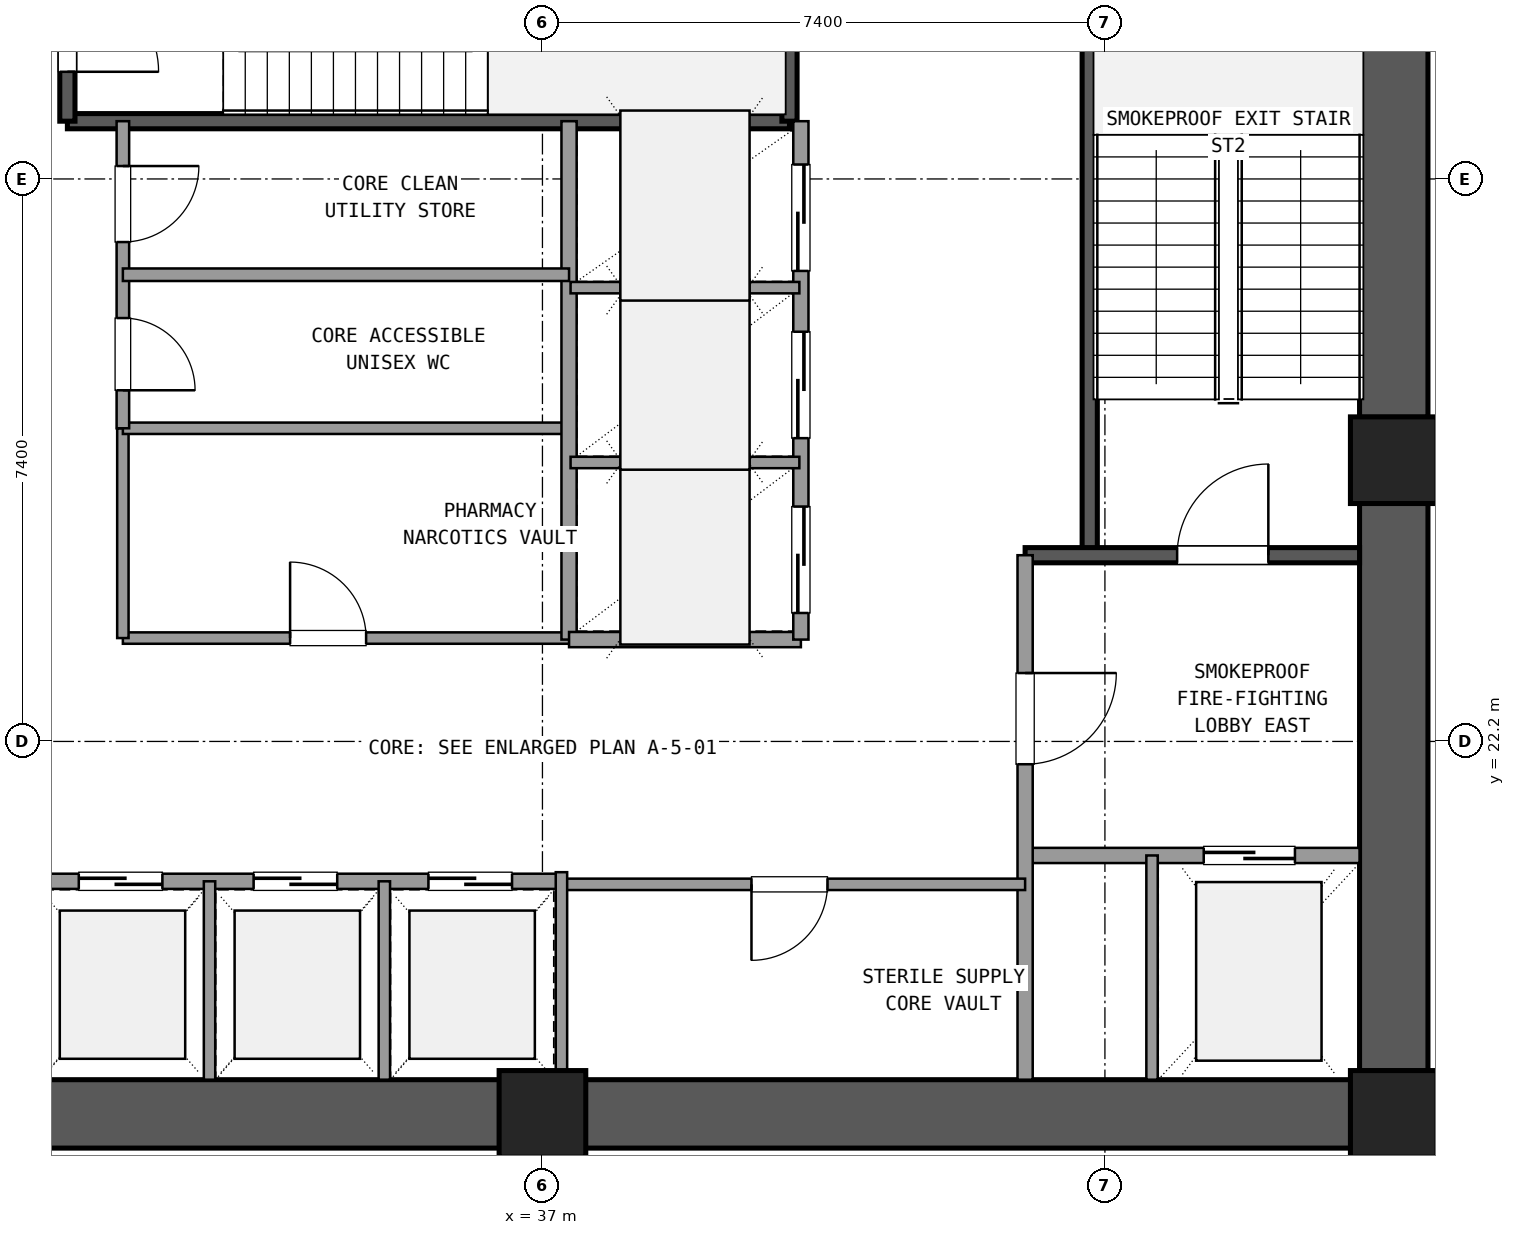
"""IFC4 building model, lengths in metres.
Left out: names, types, materials, properties, quantities, classifications, styles, units other than length and angle.
Written with IfcOpenShell. Run it as: python <this file> out.ifc"""

import sys

from ifc_helpers import new_model, si_unit, direction, frame, frame_2d, origin, origin_2d, place, context, subcontext, project, spatial, rectangle, extrude, element, fill, save


model = new_model("IFC4")
c1 = context("Model", 3, precision=1e-05, world=origin(), true_north=direction((0.0, 1.0)))
c2 = subcontext(c1, "Body", "Model", "MODEL_VIEW")
j1 = project(units=[si_unit("LENGTHUNIT", "METRE"), si_unit("PLANEANGLEUNIT", "RADIAN")], contexts=[c1])
p1 = place(None, origin())
s1 = spatial("IfcSite", under=j1, at=p1, CompositionType="ELEMENT")
p2 = place(p1, origin())
s2 = spatial("IfcBuilding", under=s1, at=p2, CompositionType="ELEMENT")
p3 = place(p2, frame((0.0, 0.0, -4.86)))
s3 = spatial("IfcBuildingStorey", under=s2, at=p3, CompositionType="ELEMENT", Elevation=-4.86)
for number, where, z_axis, x_axis in (
    (1, (37.0, 17.3, 0.0), (0.0, 0.0, 1.0), (1.0, 0.0, 0.0)),
    (2, (48.2, 17.3, 0.0), (0.0, 0.0, 1.0), (1.0, 0.0, 0.0)),
    (3, (48.2, 25.9, 0.0), (0.0, 0.0, 1.0), (1.0, 0.0, 0.0)),
):
    element("IfcColumn", number, at=place(p3, frame(where, z_axis=z_axis, x_axis=x_axis)), inside=s3, PredefinedType="COLUMN", context=c2, shape_type="SweptSolid", body=[
        extrude(rectangle(XDim=1.14, YDim=1.14, at=origin_2d()), origin(), (0.0, 0.0, 1.0), 4.86),
    ])
for number, where, z_axis, x_axis in (
    (4, (26.365, 17.3, 0.0), (0.0, 0.0, 1.0), (1.0, 0.0, 0.0)),
    (5, (37.565, 17.3, 0.0), (0.0, 0.0, 1.0), (1.0, 0.0, 0.0)),
):
    element("IfcWall", number, at=place(p3, frame(where, z_axis=z_axis, x_axis=x_axis)), inside=s3, PredefinedType="SHEAR", context=c2, shape_type="SweptSolid", body=[
        extrude(rectangle(XDim=10.07, YDim=0.9, at=frame_2d((5.035, 0.0))), origin(), (0.0, 0.0, 1.0), 4.56),
    ])
for number, where, z_axis, x_axis in (
    (6, (48.2, 17.865, 0.0), (0.0, 0.0, 1.0), (0.0, 1.0, 0.0)),
    (7, (48.2, 26.465, 0.0), (0.0, 0.0, 1.0), (0.0, 1.0, 0.0)),
):
    element("IfcWall", number, at=place(p3, frame(where, z_axis=z_axis, x_axis=x_axis)), inside=s3, PredefinedType="SHEAR", context=c2, shape_type="SweptSolid", body=[
        extrude(rectangle(XDim=7.47, YDim=0.9, at=frame_2d((3.735, 0.0))), origin(), (0.0, 0.0, 1.0), 4.56),
    ])
p4 = place(p3, frame((44.2, 24.65, 0.0), z_axis=(0.0, 0.0, 1.0), x_axis=(0.0, 1.0, 0.0)))
e8 = element("IfcWall", 8, at=p4, inside=s3, PredefinedType="SHEAR", context=c2, shape_type="SweptSolid", body=[
    extrude(rectangle(XDim=9.4, YDim=0.2, at=frame_2d((4.7, 0.0))), origin(), (0.0, 0.0, 1.0), 4.56),
])
p5 = place(p3, frame((43.35, 24.65, 0.0), z_axis=(0.0, 0.0, 1.0), x_axis=(1.0, 0.0, 0.0)))
e9 = element("IfcWall", 9, at=p5, inside=s3, PredefinedType="SHEAR", context=c2, shape_type="SweptSolid", body=[
    extrude(rectangle(XDim=4.4, YDim=0.2, at=frame_2d((2.2, 0.0))), origin(), (0.0, 0.0, 1.0), 4.56),
])
p6 = place(p5, frame((2.0, 0.0, 0.0)))
e10 = element("IfcOpeningElement", 10, at=p6, cuts=e9, PredefinedType="OPENING", context=c2, shape_type="SweptSolid", body=[
    extrude(rectangle(XDim=1.2, YDim=2.15, at=frame_2d((0.6, 1.075))), frame((0.0, 0.11, 0.0), z_axis=(0.0, -1.0, 0.0), x_axis=(1.0, 0.0, 0.0)), (0.0, 0.0, 1.0), 0.22),
])
p7 = place(p3, frame((30.75, 30.36, 0.0), z_axis=(0.0, 0.0, 1.0), x_axis=(1.0, 0.0, 0.0)))
e11 = element("IfcWall", 11, at=p7, inside=s3, PredefinedType="SHEAR", context=c2, shape_type="SweptSolid", body=[
    extrude(rectangle(XDim=9.5, YDim=0.2, at=frame_2d((4.75, 0.0))), origin(), (0.0, 0.0, 1.0), 4.56),
])
p8 = place(p3, frame((30.75, 30.36, 0.0), z_axis=(0.0, 0.0, 1.0), x_axis=(0.0, 1.0, 0.0)))
e12 = element("IfcWall", 12, at=p8, inside=s3, PredefinedType="SHEAR", context=c2, shape_type="SweptSolid", body=[
    extrude(rectangle(XDim=3.69, YDim=0.2, at=frame_2d((1.845, 0.0))), origin(), (0.0, 0.0, 1.0), 4.56),
])
p9 = place(p8, frame((0.65, 0.0, 0.0)))
e13 = element("IfcOpeningElement", 13, at=p9, cuts=e12, PredefinedType="OPENING", context=c2, shape_type="SweptSolid", body=[
    extrude(rectangle(XDim=1.2, YDim=2.15, at=frame_2d((0.6, 1.075))), frame((0.0, 0.11, 0.0), z_axis=(0.0, -1.0, 0.0), x_axis=(1.0, 0.0, 0.0)), (0.0, 0.0, 1.0), 0.22),
])
p10 = place(p3, frame((40.25, 30.36, 0.0), z_axis=(0.0, 0.0, 1.0), x_axis=(0.0, 1.0, 0.0)))
e14 = element("IfcWall", 14, at=p10, inside=s3, PredefinedType="SHEAR", context=c2, shape_type="SweptSolid", body=[
    extrude(rectangle(XDim=3.69, YDim=0.2, at=frame_2d((1.845, 0.0))), origin(), (0.0, 0.0, 1.0), 4.56),
])
p11 = place(p3, frame((43.35, 20.7, 0.0), z_axis=(0.0, 0.0, 1.0), x_axis=(1.0, 0.0, 0.0)))
e15 = element("IfcWall", 15, at=p11, inside=s3, PredefinedType="SOLIDWALL", context=c2, shape_type="SweptSolid", body=[
    extrude(rectangle(XDim=4.4, YDim=0.2, at=frame_2d((2.2, 0.0))), origin(), (0.0, 0.0, 1.0), 3.85),
])
p12 = place(p11, frame((2.35, 0.0, 0.0)))
e16 = element("IfcOpeningElement", 16, at=p12, cuts=e15, PredefinedType="OPENING", context=c2, shape_type="SweptSolid", body=[
    extrude(rectangle(XDim=1.2, YDim=2.15, at=frame_2d((0.6, 1.075))), frame((0.0, 0.11, 0.0), z_axis=(0.0, -1.0, 0.0), x_axis=(1.0, 0.0, 0.0)), (0.0, 0.0, 1.0), 0.22),
])
p13 = place(p3, frame((43.35, 17.75, 0.0), z_axis=(0.0, 0.0, 1.0), x_axis=(0.0, 1.0, 0.0)))
e17 = element("IfcWall", 17, at=p13, inside=s3, PredefinedType="SOLIDWALL", context=c2, shape_type="SweptSolid", body=[
    extrude(rectangle(XDim=6.9, YDim=0.2, at=frame_2d((3.45, 0.0))), origin(), (0.0, 0.0, 1.0), 3.85),
])
p14 = place(p13, frame((4.15, 0.0, 0.0)))
e18 = element("IfcOpeningElement", 18, at=p14, cuts=e17, PredefinedType="OPENING", context=c2, shape_type="SweptSolid", body=[
    extrude(rectangle(XDim=1.2, YDim=2.15, at=frame_2d((0.6, 1.075))), frame((0.0, 0.11, 0.0), z_axis=(0.0, -1.0, 0.0), x_axis=(1.0, 0.0, 0.0)), (0.0, 0.0, 1.0), 0.22),
])
p15 = place(p3, frame((45.02, 17.75, 0.0), z_axis=(0.0, 0.0, 1.0), x_axis=(0.0, 1.0, 0.0)))
e19 = element("IfcWall", 19, at=p15, inside=s3, PredefinedType="PARTITIONING", context=c2, shape_type="SweptSolid", body=[
    extrude(rectangle(XDim=2.95, YDim=0.15, at=frame_2d((1.475, 0.0))), origin(), (0.0, 0.0, 1.0), 3.85),
])
p16 = place(p3, frame((30.25, 20.36, 0.0), z_axis=(0.0, 0.0, 1.0), x_axis=(1.0, 0.0, 0.0)))
e20 = element("IfcWall", 20, at=p16, inside=s3, PredefinedType="SOLIDWALL", context=c2, shape_type="SweptSolid", body=[
    extrude(rectangle(XDim=7.0, YDim=0.2, at=frame_2d((3.5, 0.0))), origin(), (0.0, 0.0, 1.0), 3.85),
])
p17 = place(p16, frame((0.65, 0.0, 0.0)))
e21 = element("IfcOpeningElement", 21, at=p17, cuts=e20, PredefinedType="OPENING", context=c2, shape_type="SweptSolid", body=[
    extrude(rectangle(XDim=1.1, YDim=2.15, at=frame_2d((0.55, 1.075))), frame((0.0, 0.11, 0.0), z_axis=(0.0, -1.0, 0.0), x_axis=(1.0, 0.0, 0.0)), (0.0, 0.0, 1.0), 0.22),
])
p18 = place(p16, frame((2.95, 0.0, 0.0)))
e22 = element("IfcOpeningElement", 22, at=p18, cuts=e20, PredefinedType="OPENING", context=c2, shape_type="SweptSolid", body=[
    extrude(rectangle(XDim=1.1, YDim=2.15, at=frame_2d((0.55, 1.075))), frame((0.0, 0.11, 0.0), z_axis=(0.0, -1.0, 0.0), x_axis=(1.0, 0.0, 0.0)), (0.0, 0.0, 1.0), 0.22),
])
p19 = place(p16, frame((5.25, 0.0, 0.0)))
e23 = element("IfcOpeningElement", 23, at=p19, cuts=e20, PredefinedType="OPENING", context=c2, shape_type="SweptSolid", body=[
    extrude(rectangle(XDim=1.1, YDim=2.15, at=frame_2d((0.55, 1.075))), frame((0.0, 0.11, 0.0), z_axis=(0.0, -1.0, 0.0), x_axis=(1.0, 0.0, 0.0)), (0.0, 0.0, 1.0), 0.22),
])
for number, where, z_axis, x_axis in (
    (24, (32.62, 17.75, 0.0), (0.0, 0.0, 1.0), (0.0, 1.0, 0.0)),
    (25, (34.92, 17.75, 0.0), (0.0, 0.0, 1.0), (0.0, 1.0, 0.0)),
):
    element("IfcWall", number, at=place(p3, frame(where, z_axis=z_axis, x_axis=x_axis)), inside=s3, PredefinedType="PARTITIONING", context=c2, shape_type="SweptSolid", body=[
        extrude(rectangle(XDim=2.61, YDim=0.15, at=frame_2d((1.305, 0.0))), origin(), (0.0, 0.0, 1.0), 3.85),
    ])
p20 = place(p3, frame((37.25, 20.32, 0.0), z_axis=(0.0, 0.0, 1.0), x_axis=(1.0, 0.0, 0.0)))
e26 = element("IfcWall", 26, at=p20, inside=s3, PredefinedType="PARTITIONING", context=c2, shape_type="SweptSolid", body=[
    extrude(rectangle(XDim=6.1, YDim=0.15, at=frame_2d((3.05, 0.0))), origin(), (0.0, 0.0, 1.0), 3.85),
])
p21 = place(p20, frame((2.5, 0.0, 0.0)))
e27 = element("IfcOpeningElement", 27, at=p21, cuts=e26, PredefinedType="OPENING", context=c2, shape_type="SweptSolid", body=[
    extrude(rectangle(XDim=1.0, YDim=2.15, at=frame_2d((0.5, 1.075))), frame((0.0, 0.085, 0.0), z_axis=(0.0, -1.0, 0.0), x_axis=(1.0, 0.0, 0.0)), (0.0, 0.0, 1.0), 0.17),
])
p22 = place(p3, frame((37.25, 17.75, 0.0), z_axis=(0.0, 0.0, 1.0), x_axis=(0.0, 1.0, 0.0)))
e28 = element("IfcWall", 28, at=p22, inside=s3, PredefinedType="PARTITIONING", context=c2, shape_type="SweptSolid", body=[
    extrude(rectangle(XDim=2.73, YDim=0.15, at=frame_2d((1.365, 0.0))), origin(), (0.0, 0.0, 1.0), 3.85),
])
p23 = place(p3, frame((31.48, 23.56, 0.0), z_axis=(0.0, 0.0, 1.0), x_axis=(1.0, 0.0, 0.0)))
e29 = element("IfcWall", 29, at=p23, inside=s3, PredefinedType="PARTITIONING", context=c2, shape_type="SweptSolid", body=[
    extrude(rectangle(XDim=5.89, YDim=0.15, at=frame_2d((2.945, 0.0))), origin(), (0.0, 0.0, 1.0), 3.85),
])
p24 = place(p23, frame((2.2, 0.0, 0.0)))
e30 = element("IfcOpeningElement", 30, at=p24, cuts=e29, PredefinedType="OPENING", context=c2, shape_type="SweptSolid", body=[
    extrude(rectangle(XDim=1.0, YDim=2.15, at=frame_2d((0.5, 1.075))), frame((0.0, 0.085, 0.0), z_axis=(0.0, -1.0, 0.0), x_axis=(1.0, 0.0, 0.0)), (0.0, 0.0, 1.0), 0.17),
])
p25 = place(p3, frame((31.48, 23.56, 0.0), z_axis=(0.0, 0.0, 1.0), x_axis=(0.0, 1.0, 0.0)))
e31 = element("IfcWall", 31, at=p25, inside=s3, PredefinedType="PARTITIONING", context=c2, shape_type="SweptSolid", body=[
    extrude(rectangle(XDim=2.76, YDim=0.15, at=frame_2d((1.38, 0.0))), origin(), (0.0, 0.0, 1.0), 3.85),
])
p26 = place(p3, frame((31.48, 26.32, 0.0), z_axis=(0.0, 0.0, 1.0), x_axis=(1.0, 0.0, 0.0)))
e32 = element("IfcWall", 32, at=p26, inside=s3, PredefinedType="PARTITIONING", context=c2, shape_type="SweptSolid", body=[
    extrude(rectangle(XDim=5.89, YDim=0.15, at=frame_2d((2.945, 0.0))), origin(), (0.0, 0.0, 1.0), 3.85),
])
p27 = place(p3, frame((37.35, 23.54, 0.0), z_axis=(0.0, 0.0, 1.0), x_axis=(0.0, 1.0, 0.0)))
e33 = element("IfcWall", 33, at=p27, inside=s3, PredefinedType="SOLIDWALL", context=c2, shape_type="SweptSolid", body=[
    extrude(rectangle(XDim=6.82, YDim=0.2, at=frame_2d((3.41, 0.0))), origin(), (0.0, 0.0, 1.0), 3.85),
])
p28 = place(p3, frame((37.35, 23.54, 0.0), z_axis=(0.0, 0.0, 1.0), x_axis=(1.0, 0.0, 0.0)))
e34 = element("IfcWall", 34, at=p28, inside=s3, PredefinedType="SOLIDWALL", context=c2, shape_type="SweptSolid", body=[
    extrude(rectangle(XDim=3.05, YDim=0.2, at=frame_2d((1.525, 0.0))), origin(), (0.0, 0.0, 1.0), 3.85),
])
p29 = place(p3, frame((40.4, 23.54, 0.0), z_axis=(0.0, 0.0, 1.0), x_axis=(0.0, 1.0, 0.0)))
e35 = element("IfcWall", 35, at=p29, inside=s3, PredefinedType="SOLIDWALL", context=c2, shape_type="SweptSolid", body=[
    extrude(rectangle(XDim=6.82, YDim=0.2, at=frame_2d((3.41, 0.0))), origin(), (0.0, 0.0, 1.0), 3.85),
])
p30 = place(p29, frame((0.35, 0.0, 0.0)))
e36 = element("IfcOpeningElement", 36, at=p30, cuts=e35, PredefinedType="OPENING", context=c2, shape_type="SweptSolid", body=[
    extrude(rectangle(XDim=1.4, YDim=2.2, at=frame_2d((0.7, 1.1))), frame((0.0, 0.11, 0.0), z_axis=(0.0, -1.0, 0.0), x_axis=(1.0, 0.0, 0.0)), (0.0, 0.0, 1.0), 0.22),
])
p31 = place(p29, frame((2.65, 0.0, 0.0)))
e37 = element("IfcOpeningElement", 37, at=p31, cuts=e35, PredefinedType="OPENING", context=c2, shape_type="SweptSolid", body=[
    extrude(rectangle(XDim=1.4, YDim=2.2, at=frame_2d((0.7, 1.1))), frame((0.0, 0.11, 0.0), z_axis=(0.0, -1.0, 0.0), x_axis=(1.0, 0.0, 0.0)), (0.0, 0.0, 1.0), 0.22),
])
p32 = place(p29, frame((4.85, 0.0, 0.0)))
e38 = element("IfcOpeningElement", 38, at=p32, cuts=e35, PredefinedType="OPENING", context=c2, shape_type="SweptSolid", body=[
    extrude(rectangle(XDim=1.4, YDim=2.2, at=frame_2d((0.7, 1.1))), frame((0.0, 0.11, 0.0), z_axis=(0.0, -1.0, 0.0), x_axis=(1.0, 0.0, 0.0)), (0.0, 0.0, 1.0), 0.22),
])
for number, where, z_axis, x_axis in (
    (39, (37.37, 25.87, 0.0), (0.0, 0.0, 1.0), (1.0, 0.0, 0.0)),
    (40, (37.37, 28.17, 0.0), (0.0, 0.0, 1.0), (1.0, 0.0, 0.0)),
):
    element("IfcWall", number, at=place(p3, frame(where, z_axis=z_axis, x_axis=x_axis)), inside=s3, PredefinedType="PARTITIONING", context=c2, shape_type="SweptSolid", body=[
        extrude(rectangle(XDim=3.01, YDim=0.15, at=frame_2d((1.505, 0.0))), origin(), (0.0, 0.0, 1.0), 3.85),
    ])
p33 = place(p3, frame((31.48, 26.32, 0.0), z_axis=(0.0, 0.0, 1.0), x_axis=(0.0, 1.0, 0.0)))
e41 = element("IfcWall", 41, at=p33, inside=s3, PredefinedType="PLUMBINGWALL", context=c2, shape_type="SweptSolid", body=[
    extrude(rectangle(XDim=4.04, YDim=0.165, at=frame_2d((2.02, 0.0))), origin(), (0.0, 0.0, 1.0), 3.85),
])
p34 = place(p33, frame((0.5, 0.0, 0.0)))
e42 = element("IfcOpeningElement", 42, at=p34, cuts=e41, PredefinedType="OPENING", context=c2, shape_type="SweptSolid", body=[
    extrude(rectangle(XDim=0.95, YDim=2.1, at=frame_2d((0.475, 1.05))), frame((0.0, 0.093, 0.0), z_axis=(0.0, -1.0, 0.0), x_axis=(1.0, 0.0, 0.0)), (0.0, 0.0, 1.0), 0.185),
])
p35 = place(p33, frame((2.45, 0.0, 0.0)))
e43 = element("IfcOpeningElement", 43, at=p35, cuts=e41, PredefinedType="OPENING", context=c2, shape_type="SweptSolid", body=[
    extrude(rectangle(XDim=1.0, YDim=2.15, at=frame_2d((0.5, 1.075))), frame((0.0, 0.093, 0.0), z_axis=(0.0, -1.0, 0.0), x_axis=(1.0, 0.0, 0.0)), (0.0, 0.0, 1.0), 0.185),
])
p36 = place(p3, frame((31.48, 28.34, 0.0), z_axis=(0.0, 0.0, 1.0), x_axis=(1.0, 0.0, 0.0)))
e44 = element("IfcWall", 44, at=p36, inside=s3, PredefinedType="PLUMBINGWALL", context=c2, shape_type="SweptSolid", body=[
    extrude(rectangle(XDim=5.87, YDim=0.165, at=frame_2d((2.935, 0.0))), origin(), (0.0, 0.0, 1.0), 3.85),
])
p37 = place(p6, origin())
e45 = element("IfcDoor", 45, at=p37, inside=s3, OperationType="SINGLE_SWING_RIGHT", PredefinedType="DOOR", context=c2, shape_type="SweptSolid", body=[
    extrude(rectangle(XDim=1.2, YDim=2.15, at=frame_2d((0.6, 1.075))), frame((0.0, 0.025, 0.0), z_axis=(0.0, -1.0, 0.0), x_axis=(1.0, 0.0, 0.0)), (0.0, 0.0, 1.0), 0.05),
])
fill(e10, e45)
p38 = place(p12, origin())
e46 = element("IfcDoor", 46, at=p38, inside=s3, OperationType="SLIDING_TO_RIGHT", PredefinedType="DOOR", context=c2, shape_type="SweptSolid", body=[
    extrude(rectangle(XDim=1.2, YDim=2.15, at=frame_2d((0.6, 1.075))), frame((0.0, 0.025, 0.0), z_axis=(0.0, -1.0, 0.0), x_axis=(1.0, 0.0, 0.0)), (0.0, 0.0, 1.0), 0.05),
])
fill(e16, e46)
p39 = place(p14, frame((1.2, 0.0, 0.0), z_axis=(0.0, 0.0, 1.0), x_axis=(-1.0, 0.0, 0.0)))
e47 = element("IfcDoor", 47, at=p39, inside=s3, OperationType="SINGLE_SWING_RIGHT", PredefinedType="DOOR", context=c2, shape_type="SweptSolid", body=[
    extrude(rectangle(XDim=1.2, YDim=2.15, at=frame_2d((0.6, 1.075))), frame((0.0, 0.025, 0.0), z_axis=(0.0, -1.0, 0.0), x_axis=(1.0, 0.0, 0.0)), (0.0, 0.0, 1.0), 0.05),
])
fill(e18, e47)
p40 = place(p17, origin())
e48 = element("IfcDoor", 48, at=p40, inside=s3, OperationType="SLIDING_TO_LEFT", PredefinedType="DOOR", context=c2, shape_type="SweptSolid", body=[
    extrude(rectangle(XDim=1.1, YDim=2.15, at=frame_2d((0.55, 1.075))), frame((0.0, 0.025, 0.0), z_axis=(0.0, -1.0, 0.0), x_axis=(1.0, 0.0, 0.0)), (0.0, 0.0, 1.0), 0.05),
])
fill(e21, e48)
p41 = place(p18, origin())
e49 = element("IfcDoor", 49, at=p41, inside=s3, OperationType="SLIDING_TO_LEFT", PredefinedType="DOOR", context=c2, shape_type="SweptSolid", body=[
    extrude(rectangle(XDim=1.1, YDim=2.15, at=frame_2d((0.55, 1.075))), frame((0.0, 0.025, 0.0), z_axis=(0.0, -1.0, 0.0), x_axis=(1.0, 0.0, 0.0)), (0.0, 0.0, 1.0), 0.05),
])
fill(e22, e49)
p42 = place(p19, origin())
e50 = element("IfcDoor", 50, at=p42, inside=s3, OperationType="SLIDING_TO_LEFT", PredefinedType="DOOR", context=c2, shape_type="SweptSolid", body=[
    extrude(rectangle(XDim=1.1, YDim=2.15, at=frame_2d((0.55, 1.075))), frame((0.0, 0.025, 0.0), z_axis=(0.0, -1.0, 0.0), x_axis=(1.0, 0.0, 0.0)), (0.0, 0.0, 1.0), 0.05),
])
fill(e23, e50)
p43 = place(p21, frame((1.0, 0.0, 0.0), z_axis=(0.0, 0.0, 1.0), x_axis=(-1.0, 0.0, 0.0)))
e51 = element("IfcDoor", 51, at=p43, inside=s3, OperationType="SINGLE_SWING_LEFT", PredefinedType="DOOR", context=c2, shape_type="SweptSolid", body=[
    extrude(rectangle(XDim=1.0, YDim=2.15, at=frame_2d((0.5, 1.075))), frame((0.0, 0.025, 0.0), z_axis=(0.0, -1.0, 0.0), x_axis=(1.0, 0.0, 0.0)), (0.0, 0.0, 1.0), 0.05),
])
fill(e27, e51)
p44 = place(p24, origin())
e52 = element("IfcDoor", 52, at=p44, inside=s3, OperationType="SINGLE_SWING_LEFT", PredefinedType="DOOR", context=c2, shape_type="SweptSolid", body=[
    extrude(rectangle(XDim=1.0, YDim=2.15, at=frame_2d((0.5, 1.075))), frame((0.0, 0.025, 0.0), z_axis=(0.0, -1.0, 0.0), x_axis=(1.0, 0.0, 0.0)), (0.0, 0.0, 1.0), 0.05),
])
fill(e30, e52)
p45 = place(p30, origin())
e53 = element("IfcDoor", 53, at=p45, inside=s3, OperationType="SLIDING_TO_LEFT", PredefinedType="DOOR", context=c2, shape_type="SweptSolid", body=[
    extrude(rectangle(XDim=1.4, YDim=2.2, at=frame_2d((0.7, 1.1))), frame((0.0, 0.025, 0.0), z_axis=(0.0, -1.0, 0.0), x_axis=(1.0, 0.0, 0.0)), (0.0, 0.0, 1.0), 0.05),
])
fill(e36, e53)
p46 = place(p31, origin())
e54 = element("IfcDoor", 54, at=p46, inside=s3, OperationType="SLIDING_TO_LEFT", PredefinedType="DOOR", context=c2, shape_type="SweptSolid", body=[
    extrude(rectangle(XDim=1.4, YDim=2.2, at=frame_2d((0.7, 1.1))), frame((0.0, 0.025, 0.0), z_axis=(0.0, -1.0, 0.0), x_axis=(1.0, 0.0, 0.0)), (0.0, 0.0, 1.0), 0.05),
])
fill(e37, e54)
p47 = place(p32, origin())
e55 = element("IfcDoor", 55, at=p47, inside=s3, OperationType="SLIDING_TO_RIGHT", PredefinedType="DOOR", context=c2, shape_type="SweptSolid", body=[
    extrude(rectangle(XDim=1.4, YDim=2.2, at=frame_2d((0.7, 1.1))), frame((0.0, 0.025, 0.0), z_axis=(0.0, -1.0, 0.0), x_axis=(1.0, 0.0, 0.0)), (0.0, 0.0, 1.0), 0.05),
])
fill(e38, e55)
p48 = place(p9, frame((1.2, 0.0, 0.0), z_axis=(0.0, 0.0, 1.0), x_axis=(-1.0, 0.0, 0.0)))
e56 = element("IfcDoor", 56, at=p48, inside=s3, OperationType="SINGLE_SWING_LEFT", PredefinedType="DOOR", context=c2, shape_type="SweptSolid", body=[
    extrude(rectangle(XDim=1.2, YDim=2.15, at=frame_2d((0.6, 1.075))), frame((0.0, 0.025, 0.0), z_axis=(0.0, -1.0, 0.0), x_axis=(1.0, 0.0, 0.0)), (0.0, 0.0, 1.0), 0.05),
])
fill(e13, e56)
p49 = place(p34, frame((0.95, 0.0, 0.0), z_axis=(0.0, 0.0, 1.0), x_axis=(-1.0, 0.0, 0.0)))
e57 = element("IfcDoor", 57, at=p49, inside=s3, OperationType="SINGLE_SWING_LEFT", PredefinedType="DOOR", context=c2, shape_type="SweptSolid", body=[
    extrude(rectangle(XDim=0.95, YDim=2.1, at=frame_2d((0.475, 1.05))), frame((0.0, 0.025, 0.0), z_axis=(0.0, -1.0, 0.0), x_axis=(1.0, 0.0, 0.0)), (0.0, 0.0, 1.0), 0.05),
])
fill(e42, e57)
p50 = place(p35, frame((1.0, 0.0, 0.0), z_axis=(0.0, 0.0, 1.0), x_axis=(-1.0, 0.0, 0.0)))
e58 = element("IfcDoor", 58, at=p50, inside=s3, OperationType="SINGLE_SWING_RIGHT", PredefinedType="DOOR", context=c2, shape_type="SweptSolid", body=[
    extrude(rectangle(XDim=1.0, YDim=2.15, at=frame_2d((0.5, 1.075))), frame((0.0, 0.025, 0.0), z_axis=(0.0, -1.0, 0.0), x_axis=(1.0, 0.0, 0.0)), (0.0, 0.0, 1.0), 0.05),
])
fill(e43, e58)
save(model, sys.argv[1])
